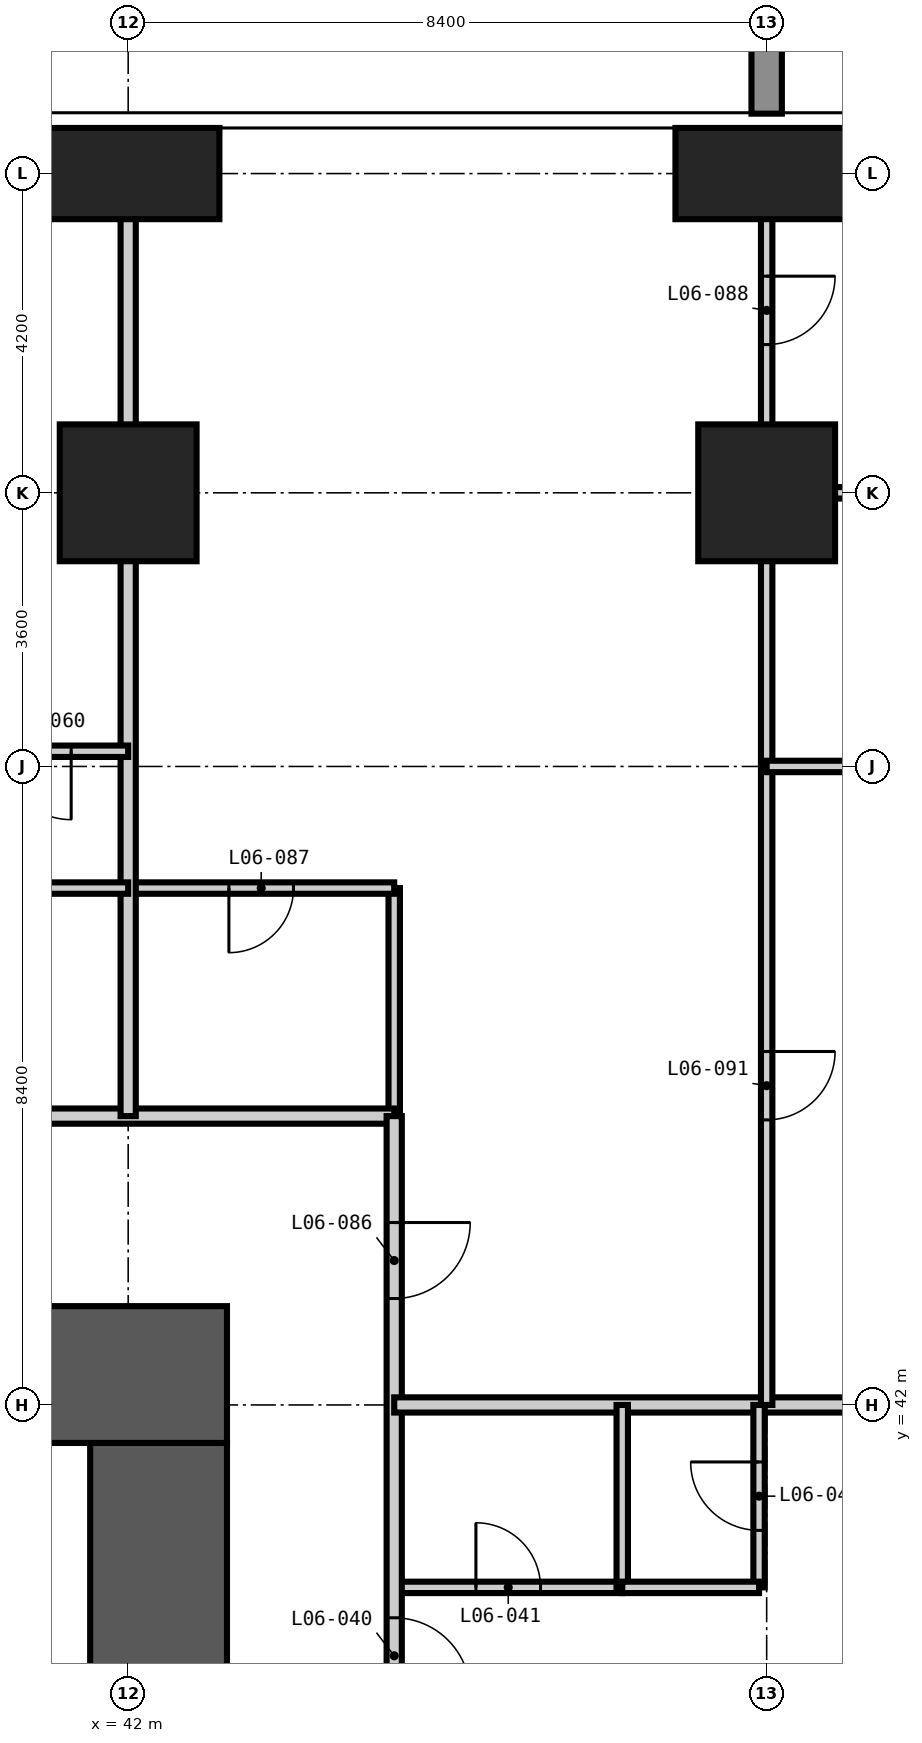
"""IFC4 building model, lengths in metres.
Left out: names, types, materials, properties, quantities, classifications, styles, units other than length and angle.
Written with IfcOpenShell. Run it as: python <this file> out.ifc"""

import sys

from ifc_helpers import new_model, si_unit, direction, frame, frame_2d, origin, origin_2d, place, context, subcontext, project, spatial, rectangle, extrude, element, fill, save


model = new_model("IFC4")
c1 = context("Model", 3, precision=1e-05, world=origin(), true_north=direction((0.0, 1.0)))
c2 = subcontext(c1, "Body", "Model", "MODEL_VIEW")
j1 = project(units=[si_unit("LENGTHUNIT", "METRE"), si_unit("PLANEANGLEUNIT", "RADIAN")], contexts=[c1])
p1 = place(None, origin())
s1 = spatial("IfcSite", under=j1, at=p1, CompositionType="ELEMENT")
p2 = place(p1, origin())
s2 = spatial("IfcBuilding", under=s1, at=p2, CompositionType="ELEMENT")
p3 = place(p2, frame((0.0, 0.0, 30.6)))
s3 = spatial("IfcBuildingStorey", under=s2, at=p3, CompositionType="ELEMENT", Elevation=30.6)
p4 = place(p3, frame((42.0, 54.0, -0.35), z_axis=(0.0, 0.0, 1.0), x_axis=(1.0, 0.0, 0.0)))
e1 = element("IfcColumn", 1, at=p4, inside=s3, PredefinedType="COLUMN", context=c2, shape_type="SweptSolid", body=[
    extrude(rectangle(XDim=1.8, YDim=1.8, at=origin_2d()), origin(), (0.0, 0.0, 1.0), 3.6),
])
p5 = place(p3, frame((42.0, 58.2, -0.35), z_axis=(0.0, 0.0, 1.0), x_axis=(1.0, 0.0, 0.0)))
e2 = element("IfcColumn", 2, at=p5, inside=s3, PredefinedType="COLUMN", context=c2, shape_type="SweptSolid", body=[
    extrude(rectangle(XDim=2.4, YDim=1.2, at=origin_2d()), origin(), (0.0, 0.0, 1.0), 3.6),
])
p6 = place(p3, frame((50.4, 54.0, -0.35), z_axis=(0.0, 0.0, 1.0), x_axis=(1.0, 0.0, 0.0)))
e3 = element("IfcColumn", 3, at=p6, inside=s3, PredefinedType="COLUMN", context=c2, shape_type="SweptSolid", body=[
    extrude(rectangle(XDim=1.8, YDim=1.8, at=origin_2d()), origin(), (0.0, 0.0, 1.0), 3.6),
])
p7 = place(p3, frame((50.4, 58.2, -0.35), z_axis=(0.0, 0.0, 1.0), x_axis=(1.0, 0.0, 0.0)))
e4 = element("IfcColumn", 4, at=p7, inside=s3, PredefinedType="COLUMN", context=c2, shape_type="SweptSolid", body=[
    extrude(rectangle(XDim=2.4, YDim=1.2, at=origin_2d()), origin(), (0.0, 0.0, 1.0), 3.6),
])
p8 = place(p3, frame((42.4, 17.3, -0.35), z_axis=(0.0, 0.0, 1.0), x_axis=(0.0, 1.0, 0.0)))
e5 = element("IfcWall", 5, at=p8, inside=s3, PredefinedType="SHEAR", context=c2, shape_type="SweptSolid", body=[
    extrude(rectangle(XDim=24.2, YDim=1.8, at=frame_2d((12.1, 0.0))), origin(), (0.0, 0.0, 1.0), 3.6),
])
p9 = place(p8, frame((0.3, 0.0, 0.35)))
e6 = element("IfcOpeningElement", 6, at=p9, cuts=e5, PredefinedType="OPENING", context=c2, shape_type="SweptSolid", body=[
    extrude(rectangle(XDim=1.2, YDim=2.2, at=frame_2d((0.6, 1.1))), frame((0.0, 0.91, 0.0), z_axis=(0.0, -1.0, 0.0), x_axis=(1.0, 0.0, 0.0)), (0.0, 0.0, 1.0), 1.82),
])
p10 = place(p8, frame((11.6, 0.0, 0.35)))
e7 = element("IfcOpeningElement", 7, at=p10, cuts=e5, PredefinedType="OPENING", context=c2, shape_type="SweptSolid", body=[
    extrude(rectangle(XDim=1.0, YDim=2.1, at=frame_2d((0.5, 1.05))), frame((0.0, 0.91, 0.0), z_axis=(0.0, -1.0, 0.0), x_axis=(1.0, 0.0, 0.0)), (0.0, 0.0, 1.0), 1.82),
])
p11 = place(p8, frame((20.0, 0.0, 0.35)))
e8 = element("IfcOpeningElement", 8, at=p11, cuts=e5, PredefinedType="OPENING", context=c2, shape_type="SweptSolid", body=[
    extrude(rectangle(XDim=1.0, YDim=2.1, at=frame_2d((0.5, 1.05))), frame((0.0, 0.91, 0.0), z_axis=(0.0, -1.0, 0.0), x_axis=(1.0, 0.0, 0.0)), (0.0, 0.0, 1.0), 1.82),
])
p12 = place(p3, frame((43.3, 42.4, -0.35), z_axis=(0.0, 0.0, 1.0), x_axis=(-1.0, 0.0, 0.0)))
e9 = element("IfcWall", 9, at=p12, inside=s3, PredefinedType="SHEAR", context=c2, shape_type="SweptSolid", body=[
    extrude(rectangle(XDim=27.8, YDim=1.8, at=frame_2d((13.9, 0.0))), origin(), (0.0, 0.0, 1.0), 3.6),
])
p13 = place(p12, frame((21.8, 0.0, 0.35)))
e10 = element("IfcOpeningElement", 10, at=p13, cuts=e9, PredefinedType="OPENING", context=c2, shape_type="SweptSolid", body=[
    extrude(rectangle(XDim=1.0, YDim=2.1, at=frame_2d((0.5, 1.05))), frame((0.0, 0.91, 0.0), z_axis=(0.0, -1.0, 0.0), x_axis=(1.0, 0.0, 0.0)), (0.0, 0.0, 1.0), 1.82),
])
p14 = place(p12, frame((11.2, 0.0, 0.35)))
e11 = element("IfcOpeningElement", 11, at=p14, cuts=e9, PredefinedType="OPENING", context=c2, shape_type="SweptSolid", body=[
    extrude(rectangle(XDim=1.2, YDim=2.2, at=frame_2d((0.6, 1.1))), frame((0.0, 0.91, 0.0), z_axis=(0.0, -1.0, 0.0), x_axis=(1.0, 0.0, 0.0)), (0.0, 0.0, 1.0), 1.82),
])
p15 = place(p3, frame((45.5, 45.8, 0.0), z_axis=(0.0, 0.0, 1.0), x_axis=(0.0, 1.0, 0.0)))
e12 = element("IfcWall", 12, at=p15, inside=s3, PredefinedType="PARTITIONING", context=c2, shape_type="SweptSolid", body=[
    extrude(rectangle(XDim=3.0, YDim=0.15, at=frame_2d((1.5, 0.0))), origin(), (0.0, 0.0, 1.0), 3.25),
])
p16 = place(p3, frame((45.5, 39.6, 0.0), z_axis=(0.0, 0.0, 1.0), x_axis=(1.0, 0.0, 0.0)))
e13 = element("IfcWall", 13, at=p16, inside=s3, PredefinedType="PARTITIONING", context=c2, shape_type="SweptSolid", body=[
    extrude(rectangle(XDim=3.0, YDim=0.15, at=frame_2d((1.5, 0.0))), origin(), (0.0, 0.0, 1.0), 3.25),
])
p17 = place(p16, frame((1.075, 0.0, 0.0)))
e14 = element("IfcOpeningElement", 14, at=p17, cuts=e13, PredefinedType="OPENING", context=c2, shape_type="SweptSolid", body=[
    extrude(rectangle(XDim=0.85, YDim=2.1, at=frame_2d((0.425, 1.05))), frame((0.0, 0.085, 0.0), z_axis=(0.0, -1.0, 0.0), x_axis=(1.0, 0.0, 0.0)), (0.0, 0.0, 1.0), 0.17),
])
p18 = place(p3, frame((42.0, 48.8, 0.0), z_axis=(0.0, 0.0, 1.0), x_axis=(1.0, 0.0, 0.0)))
e15 = element("IfcWall", 15, at=p18, inside=s3, PredefinedType="PARTITIONING", context=c2, shape_type="SweptSolid", body=[
    extrude(rectangle(XDim=3.5, YDim=0.15, at=frame_2d((1.75, 0.0))), origin(), (0.0, 0.0, 1.0), 3.25),
])
p19 = place(p18, frame((1.325, 0.0, 0.0)))
e16 = element("IfcOpeningElement", 16, at=p19, cuts=e15, PredefinedType="OPENING", context=c2, shape_type="SweptSolid", body=[
    extrude(rectangle(XDim=0.85, YDim=2.1, at=frame_2d((0.425, 1.05))), frame((0.0, 0.085, 0.0), z_axis=(0.0, -1.0, 0.0), x_axis=(1.0, 0.0, 0.0)), (0.0, 0.0, 1.0), 0.17),
])
p20 = place(p3, frame((50.4, 54.0, 0.0), z_axis=(0.0, 0.0, 1.0), x_axis=(1.0, 0.0, 0.0)))
e17 = element("IfcWall", 17, at=p20, inside=s3, PredefinedType="PARTITIONING", context=c2, shape_type="SweptSolid", body=[
    extrude(rectangle(XDim=3.0, YDim=0.15, at=frame_2d((1.5, 0.0))), origin(), (0.0, 0.0, 1.0), 3.25),
])
p21 = place(p3, frame((13.6, 45.8, 0.0), z_axis=(0.0, 0.0, 1.0), x_axis=(1.0, 0.0, 0.0)))
e18 = element("IfcWall", 18, at=p21, inside=s3, PredefinedType="PARTITIONING", context=c2, shape_type="SweptSolid", body=[
    extrude(rectangle(XDim=31.9, YDim=0.2, at=frame_2d((15.95, 0.0))), origin(), (0.0, 0.0, 1.0), 3.25),
])
p22 = place(p21, frame((6.0, 0.0, 0.0)))
e19 = element("IfcOpeningElement", 19, at=p22, cuts=e18, PredefinedType="OPENING", context=c2, shape_type="SweptSolid", body=[
    extrude(rectangle(XDim=1.0, YDim=2.2, at=frame_2d((0.5, 1.1))), frame((0.0, 0.11, 0.0), z_axis=(0.0, -1.0, 0.0), x_axis=(1.0, 0.0, 0.0)), (0.0, 0.0, 1.0), 0.22),
])
p23 = place(p21, frame((7.8, 0.0, 0.0)))
e20 = element("IfcOpeningElement", 20, at=p23, cuts=e18, PredefinedType="OPENING", context=c2, shape_type="SweptSolid", body=[
    extrude(rectangle(XDim=1.0, YDim=2.2, at=frame_2d((0.5, 1.1))), frame((0.0, 0.11, 0.0), z_axis=(0.0, -1.0, 0.0), x_axis=(1.0, 0.0, 0.0)), (0.0, 0.0, 1.0), 0.22),
])
p24 = place(p21, frame((14.4, 0.0, 0.0)))
e21 = element("IfcOpeningElement", 21, at=p24, cuts=e18, PredefinedType="OPENING", context=c2, shape_type="SweptSolid", body=[
    extrude(rectangle(XDim=1.0, YDim=2.2, at=frame_2d((0.5, 1.1))), frame((0.0, 0.11, 0.0), z_axis=(0.0, -1.0, 0.0), x_axis=(1.0, 0.0, 0.0)), (0.0, 0.0, 1.0), 0.22),
])
p25 = place(p21, frame((16.2, 0.0, 0.0)))
e22 = element("IfcOpeningElement", 22, at=p25, cuts=e18, PredefinedType="OPENING", context=c2, shape_type="SweptSolid", body=[
    extrude(rectangle(XDim=1.0, YDim=2.2, at=frame_2d((0.5, 1.1))), frame((0.0, 0.11, 0.0), z_axis=(0.0, -1.0, 0.0), x_axis=(1.0, 0.0, 0.0)), (0.0, 0.0, 1.0), 0.22),
])
p26 = place(p21, frame((22.8, 0.0, 0.0)))
e23 = element("IfcOpeningElement", 23, at=p26, cuts=e18, PredefinedType="OPENING", context=c2, shape_type="SweptSolid", body=[
    extrude(rectangle(XDim=1.0, YDim=2.2, at=frame_2d((0.5, 1.1))), frame((0.0, 0.11, 0.0), z_axis=(0.0, -1.0, 0.0), x_axis=(1.0, 0.0, 0.0)), (0.0, 0.0, 1.0), 0.22),
])
p27 = place(p21, frame((24.6, 0.0, 0.0)))
e24 = element("IfcOpeningElement", 24, at=p27, cuts=e18, PredefinedType="OPENING", context=c2, shape_type="SweptSolid", body=[
    extrude(rectangle(XDim=1.0, YDim=2.2, at=frame_2d((0.5, 1.1))), frame((0.0, 0.11, 0.0), z_axis=(0.0, -1.0, 0.0), x_axis=(1.0, 0.0, 0.0)), (0.0, 0.0, 1.0), 0.22),
])
p28 = place(p3, frame((45.5, 45.8, 0.0), z_axis=(0.0, 0.0, 1.0), x_axis=(0.0, -1.0, 0.0)))
e25 = element("IfcWall", 25, at=p28, inside=s3, PredefinedType="PARTITIONING", context=c2, shape_type="SweptSolid", body=[
    extrude(rectangle(XDim=32.2, YDim=0.2, at=frame_2d((16.1, 0.0))), origin(), (0.0, 0.0, 1.0), 3.25),
])
p29 = place(p28, frame((26.4, 0.0, 0.0)))
e26 = element("IfcOpeningElement", 26, at=p29, cuts=e25, PredefinedType="OPENING", context=c2, shape_type="SweptSolid", body=[
    extrude(rectangle(XDim=1.0, YDim=2.2, at=frame_2d((0.5, 1.1))), frame((0.0, 0.11, 0.0), z_axis=(0.0, -1.0, 0.0), x_axis=(1.0, 0.0, 0.0)), (0.0, 0.0, 1.0), 0.22),
])
p30 = place(p28, frame((22.2, 0.0, 0.0)))
e27 = element("IfcOpeningElement", 27, at=p30, cuts=e25, PredefinedType="OPENING", context=c2, shape_type="SweptSolid", body=[
    extrude(rectangle(XDim=1.0, YDim=2.2, at=frame_2d((0.5, 1.1))), frame((0.0, 0.11, 0.0), z_axis=(0.0, -1.0, 0.0), x_axis=(1.0, 0.0, 0.0)), (0.0, 0.0, 1.0), 0.22),
])
p31 = place(p28, frame((16.8, 0.0, 0.0)))
e28 = element("IfcOpeningElement", 28, at=p31, cuts=e25, PredefinedType="OPENING", context=c2, shape_type="SweptSolid", body=[
    extrude(rectangle(XDim=1.0, YDim=2.2, at=frame_2d((0.5, 1.1))), frame((0.0, 0.11, 0.0), z_axis=(0.0, -1.0, 0.0), x_axis=(1.0, 0.0, 0.0)), (0.0, 0.0, 1.0), 0.22),
])
p32 = place(p28, frame((15.0, 0.0, 0.0)))
e29 = element("IfcOpeningElement", 29, at=p32, cuts=e25, PredefinedType="OPENING", context=c2, shape_type="SweptSolid", body=[
    extrude(rectangle(XDim=1.0, YDim=2.2, at=frame_2d((0.5, 1.1))), frame((0.0, 0.11, 0.0), z_axis=(0.0, -1.0, 0.0), x_axis=(1.0, 0.0, 0.0)), (0.0, 0.0, 1.0), 0.22),
])
p33 = place(p28, frame((8.4, 0.0, 0.0)))
e30 = element("IfcOpeningElement", 30, at=p33, cuts=e25, PredefinedType="OPENING", context=c2, shape_type="SweptSolid", body=[
    extrude(rectangle(XDim=1.0, YDim=2.2, at=frame_2d((0.5, 1.1))), frame((0.0, 0.11, 0.0), z_axis=(0.0, -1.0, 0.0), x_axis=(1.0, 0.0, 0.0)), (0.0, 0.0, 1.0), 0.22),
])
p34 = place(p28, frame((6.6, 0.0, 0.0)))
e31 = element("IfcOpeningElement", 31, at=p34, cuts=e25, PredefinedType="OPENING", context=c2, shape_type="SweptSolid", body=[
    extrude(rectangle(XDim=1.0, YDim=2.2, at=frame_2d((0.5, 1.1))), frame((0.0, 0.11, 0.0), z_axis=(0.0, -1.0, 0.0), x_axis=(1.0, 0.0, 0.0)), (0.0, 0.0, 1.0), 0.22),
])
p35 = place(p28, frame((30.1, 0.0, 0.0)))
e32 = element("IfcOpeningElement", 32, at=p35, cuts=e25, PredefinedType="OPENING", context=c2, shape_type="SweptSolid", body=[
    extrude(rectangle(XDim=1.0, YDim=2.2, at=frame_2d((0.5, 1.1))), frame((0.0, 0.11, 0.0), z_axis=(0.0, -1.0, 0.0), x_axis=(1.0, 0.0, 0.0)), (0.0, 0.0, 1.0), 0.22),
])
p36 = place(p28, frame((1.4, 0.0, 0.0)))
e33 = element("IfcOpeningElement", 33, at=p36, cuts=e25, PredefinedType="OPENING", context=c2, shape_type="SweptSolid", body=[
    extrude(rectangle(XDim=1.0, YDim=2.2, at=frame_2d((0.5, 1.1))), frame((0.0, 0.11, 0.0), z_axis=(0.0, -1.0, 0.0), x_axis=(1.0, 0.0, 0.0)), (0.0, 0.0, 1.0), 0.22),
])
p37 = place(p3, frame((42.0, 45.8, 0.0), z_axis=(0.0, 0.0, 1.0), x_axis=(0.0, 1.0, 0.0)))
e34 = element("IfcWall", 34, at=p37, inside=s3, PredefinedType="PARTITIONING", context=c2, shape_type="SweptSolid", body=[
    extrude(rectangle(XDim=13.008, YDim=0.2, at=frame_2d((6.504, 0.0))), origin(), (0.0, 0.0, 1.0), 3.25),
])
p38 = place(p3, frame((45.5, 42.0, 0.0), z_axis=(0.0, 0.0, 1.0), x_axis=(1.0, 0.0, 0.0)))
e35 = element("IfcWall", 35, at=p38, inside=s3, PredefinedType="PARTITIONING", context=c2, shape_type="SweptSolid", body=[
    extrude(rectangle(XDim=13.308, YDim=0.2, at=frame_2d((6.654, 0.0))), origin(), (0.0, 0.0, 1.0), 3.25),
])
p39 = place(p3, frame((48.5, 39.6, 0.0), z_axis=(0.0, 0.0, 1.0), x_axis=(0.0, 1.0, 0.0)))
e36 = element("IfcWall", 36, at=p39, inside=s3, PredefinedType="PARTITIONING", context=c2, shape_type="SweptSolid", body=[
    extrude(rectangle(XDim=2.4, YDim=0.15, at=frame_2d((1.2, 0.0))), origin(), (0.0, 0.0, 1.0), 3.25),
])
p40 = place(p3, frame((50.3, 39.6, 0.0), z_axis=(0.0, 0.0, 1.0), x_axis=(0.0, 1.0, 0.0)))
e37 = element("IfcWall", 37, at=p40, inside=s3, PredefinedType="PARTITIONING", context=c2, shape_type="SweptSolid", body=[
    extrude(rectangle(XDim=2.4, YDim=0.15, at=frame_2d((1.2, 0.0))), origin(), (0.0, 0.0, 1.0), 3.25),
])
p41 = place(p40, frame((0.75, 0.0, 0.0)))
e38 = element("IfcOpeningElement", 38, at=p41, cuts=e37, PredefinedType="OPENING", context=c2, shape_type="SweptSolid", body=[
    extrude(rectangle(XDim=0.9, YDim=2.1, at=frame_2d((0.45, 1.05))), frame((0.0, 0.085, 0.0), z_axis=(0.0, -1.0, 0.0), x_axis=(1.0, 0.0, 0.0)), (0.0, 0.0, 1.0), 0.17),
])
p42 = place(p3, frame((50.4, 42.0, 0.0), z_axis=(0.0, 0.0, 1.0), x_axis=(0.0, 1.0, 0.0)))
e39 = element("IfcWall", 39, at=p42, inside=s3, PredefinedType="PARTITIONING", context=c2, shape_type="SweptSolid", body=[
    extrude(rectangle(XDim=16.808, YDim=0.15, at=frame_2d((8.404, 0.0))), origin(), (0.0, 0.0, 1.0), 3.25),
])
p43 = place(p42, frame((13.95, 0.0, 0.0)))
e40 = element("IfcOpeningElement", 40, at=p43, cuts=e39, PredefinedType="OPENING", context=c2, shape_type="SweptSolid", body=[
    extrude(rectangle(XDim=0.9, YDim=2.1, at=frame_2d((0.45, 1.05))), frame((0.0, 0.085, 0.0), z_axis=(0.0, -1.0, 0.0), x_axis=(1.0, 0.0, 0.0)), (0.0, 0.0, 1.0), 0.17),
])
p44 = place(p42, frame((3.75, 0.0, 0.0)))
e41 = element("IfcOpeningElement", 41, at=p44, cuts=e39, PredefinedType="OPENING", context=c2, shape_type="SweptSolid", body=[
    extrude(rectangle(XDim=0.9, YDim=2.1, at=frame_2d((0.45, 1.05))), frame((0.0, 0.085, 0.0), z_axis=(0.0, -1.0, 0.0), x_axis=(1.0, 0.0, 0.0)), (0.0, 0.0, 1.0), 0.17),
])
p45 = place(p3, frame((48.5, 39.6, 0.0), z_axis=(0.0, 0.0, 1.0), x_axis=(1.0, 0.0, 0.0)))
e42 = element("IfcWall", 42, at=p45, inside=s3, PredefinedType="PARTITIONING", context=c2, shape_type="SweptSolid", body=[
    extrude(rectangle(XDim=1.8, YDim=0.15, at=frame_2d((0.9, 0.0))), origin(), (0.0, 0.0, 1.0), 3.25),
])
p46 = place(p3, frame((39.6, 48.8, 0.0), z_axis=(0.0, 0.0, 1.0), x_axis=(1.0, 0.0, 0.0)))
e43 = element("IfcWall", 43, at=p46, inside=s3, PredefinedType="PARTITIONING", context=c2, shape_type="SweptSolid", body=[
    extrude(rectangle(XDim=2.4, YDim=0.15, at=frame_2d((1.2, 0.0))), origin(), (0.0, 0.0, 1.0), 3.25),
])
p47 = place(p3, frame((50.4, 50.4, 0.0), z_axis=(0.0, 0.0, 1.0), x_axis=(1.0, 0.0, 0.0)))
e44 = element("IfcWall", 44, at=p47, inside=s3, PredefinedType="PARTITIONING", context=c2, shape_type="SweptSolid", body=[
    extrude(rectangle(XDim=8.408, YDim=0.15, at=frame_2d((4.204, 0.0))), origin(), (0.0, 0.0, 1.0), 3.25),
])
p48 = place(p47, frame((4.55, 0.0, 0.0)))
e45 = element("IfcOpeningElement", 45, at=p48, cuts=e44, PredefinedType="OPENING", context=c2, shape_type="SweptSolid", body=[
    extrude(rectangle(XDim=0.9, YDim=2.1, at=frame_2d((0.45, 1.05))), frame((0.0, 0.085, 0.0), z_axis=(0.0, -1.0, 0.0), x_axis=(1.0, 0.0, 0.0)), (0.0, 0.0, 1.0), 0.17),
])
p49 = place(p3, frame((39.6, 50.6, 0.0), z_axis=(0.0, 0.0, 1.0), x_axis=(1.0, 0.0, 0.0)))
e46 = element("IfcWall", 46, at=p49, inside=s3, PredefinedType="PARTITIONING", context=c2, shape_type="SweptSolid", body=[
    extrude(rectangle(XDim=2.4, YDim=0.15, at=frame_2d((1.2, 0.0))), origin(), (0.0, 0.0, 1.0), 3.25),
])
p50 = place(p49, frame((0.75, 0.0, 0.0)))
e47 = element("IfcOpeningElement", 47, at=p50, cuts=e46, PredefinedType="OPENING", context=c2, shape_type="SweptSolid", body=[
    extrude(rectangle(XDim=0.9, YDim=2.1, at=frame_2d((0.45, 1.05))), frame((0.0, 0.085, 0.0), z_axis=(0.0, -1.0, 0.0), x_axis=(1.0, 0.0, 0.0)), (0.0, 0.0, 1.0), 0.17),
])
p51 = place(p34, origin())
e48 = element("IfcDoor", 48, at=p51, inside=s3, OperationType="SINGLE_SWING_RIGHT", PredefinedType="DOOR", context=c2, shape_type="SweptSolid", body=[
    extrude(rectangle(XDim=1.0, YDim=2.2, at=frame_2d((0.5, 1.1))), frame((0.0, 0.025, 0.0), z_axis=(0.0, -1.0, 0.0), x_axis=(1.0, 0.0, 0.0)), (0.0, 0.0, 1.0), 0.05),
])
fill(e31, e48)
p52 = place(p17, origin())
e49 = element("IfcDoor", 49, at=p52, inside=s3, OperationType="SINGLE_SWING_LEFT", PredefinedType="DOOR", context=c2, shape_type="SweptSolid", body=[
    extrude(rectangle(XDim=0.85, YDim=2.1, at=frame_2d((0.425, 1.05))), frame((0.0, 0.025, 0.0), z_axis=(0.0, -1.0, 0.0), x_axis=(1.0, 0.0, 0.0)), (0.0, 0.0, 1.0), 0.05),
])
fill(e14, e49)
p53 = place(p41, origin())
e50 = element("IfcDoor", 50, at=p53, inside=s3, OperationType="SINGLE_SWING_RIGHT", PredefinedType="DOOR", context=c2, shape_type="SweptSolid", body=[
    extrude(rectangle(XDim=0.9, YDim=2.1, at=frame_2d((0.45, 1.05))), frame((0.0, 0.025, 0.0), z_axis=(0.0, -1.0, 0.0), x_axis=(1.0, 0.0, 0.0)), (0.0, 0.0, 1.0), 0.05),
])
fill(e38, e50)
p54 = place(p50, frame((0.9, 0.0, 0.0), z_axis=(0.0, 0.0, 1.0), x_axis=(-1.0, 0.0, 0.0)))
e51 = element("IfcDoor", 51, at=p54, inside=s3, OperationType="SINGLE_SWING_LEFT", PredefinedType="DOOR", context=c2, shape_type="SweptSolid", body=[
    extrude(rectangle(XDim=0.9, YDim=2.1, at=frame_2d((0.45, 1.05))), frame((0.0, 0.025, 0.0), z_axis=(0.0, -1.0, 0.0), x_axis=(1.0, 0.0, 0.0)), (0.0, 0.0, 1.0), 0.05),
])
fill(e47, e51)
p55 = place(p36, origin())
e52 = element("IfcDoor", 52, at=p55, inside=s3, OperationType="SINGLE_SWING_LEFT", PredefinedType="DOOR", context=c2, shape_type="SweptSolid", body=[
    extrude(rectangle(XDim=1.0, YDim=2.2, at=frame_2d((0.5, 1.1))), frame((0.0, 0.025, 0.0), z_axis=(0.0, -1.0, 0.0), x_axis=(1.0, 0.0, 0.0)), (0.0, 0.0, 1.0), 0.05),
])
fill(e33, e52)
p56 = place(p19, frame((0.85, 0.0, 0.0), z_axis=(0.0, 0.0, 1.0), x_axis=(-1.0, 0.0, 0.0)))
e53 = element("IfcDoor", 53, at=p56, inside=s3, OperationType="SINGLE_SWING_RIGHT", PredefinedType="DOOR", context=c2, shape_type="SweptSolid", body=[
    extrude(rectangle(XDim=0.85, YDim=2.1, at=frame_2d((0.425, 1.05))), frame((0.0, 0.025, 0.0), z_axis=(0.0, -1.0, 0.0), x_axis=(1.0, 0.0, 0.0)), (0.0, 0.0, 1.0), 0.05),
])
fill(e16, e53)
p57 = place(p43, frame((0.9, 0.0, 0.0), z_axis=(0.0, 0.0, 1.0), x_axis=(-1.0, 0.0, 0.0)))
e54 = element("IfcDoor", 54, at=p57, inside=s3, OperationType="SINGLE_SWING_LEFT", PredefinedType="DOOR", context=c2, shape_type="SweptSolid", body=[
    extrude(rectangle(XDim=0.9, YDim=2.1, at=frame_2d((0.45, 1.05))), frame((0.0, 0.025, 0.0), z_axis=(0.0, -1.0, 0.0), x_axis=(1.0, 0.0, 0.0)), (0.0, 0.0, 1.0), 0.05),
])
fill(e40, e54)
p58 = place(p44, frame((0.9, 0.0, 0.0), z_axis=(0.0, 0.0, 1.0), x_axis=(-1.0, 0.0, 0.0)))
e55 = element("IfcDoor", 55, at=p58, inside=s3, OperationType="SINGLE_SWING_LEFT", PredefinedType="DOOR", context=c2, shape_type="SweptSolid", body=[
    extrude(rectangle(XDim=0.9, YDim=2.1, at=frame_2d((0.45, 1.05))), frame((0.0, 0.025, 0.0), z_axis=(0.0, -1.0, 0.0), x_axis=(1.0, 0.0, 0.0)), (0.0, 0.0, 1.0), 0.05),
])
fill(e41, e55)
save(model, sys.argv[1])
